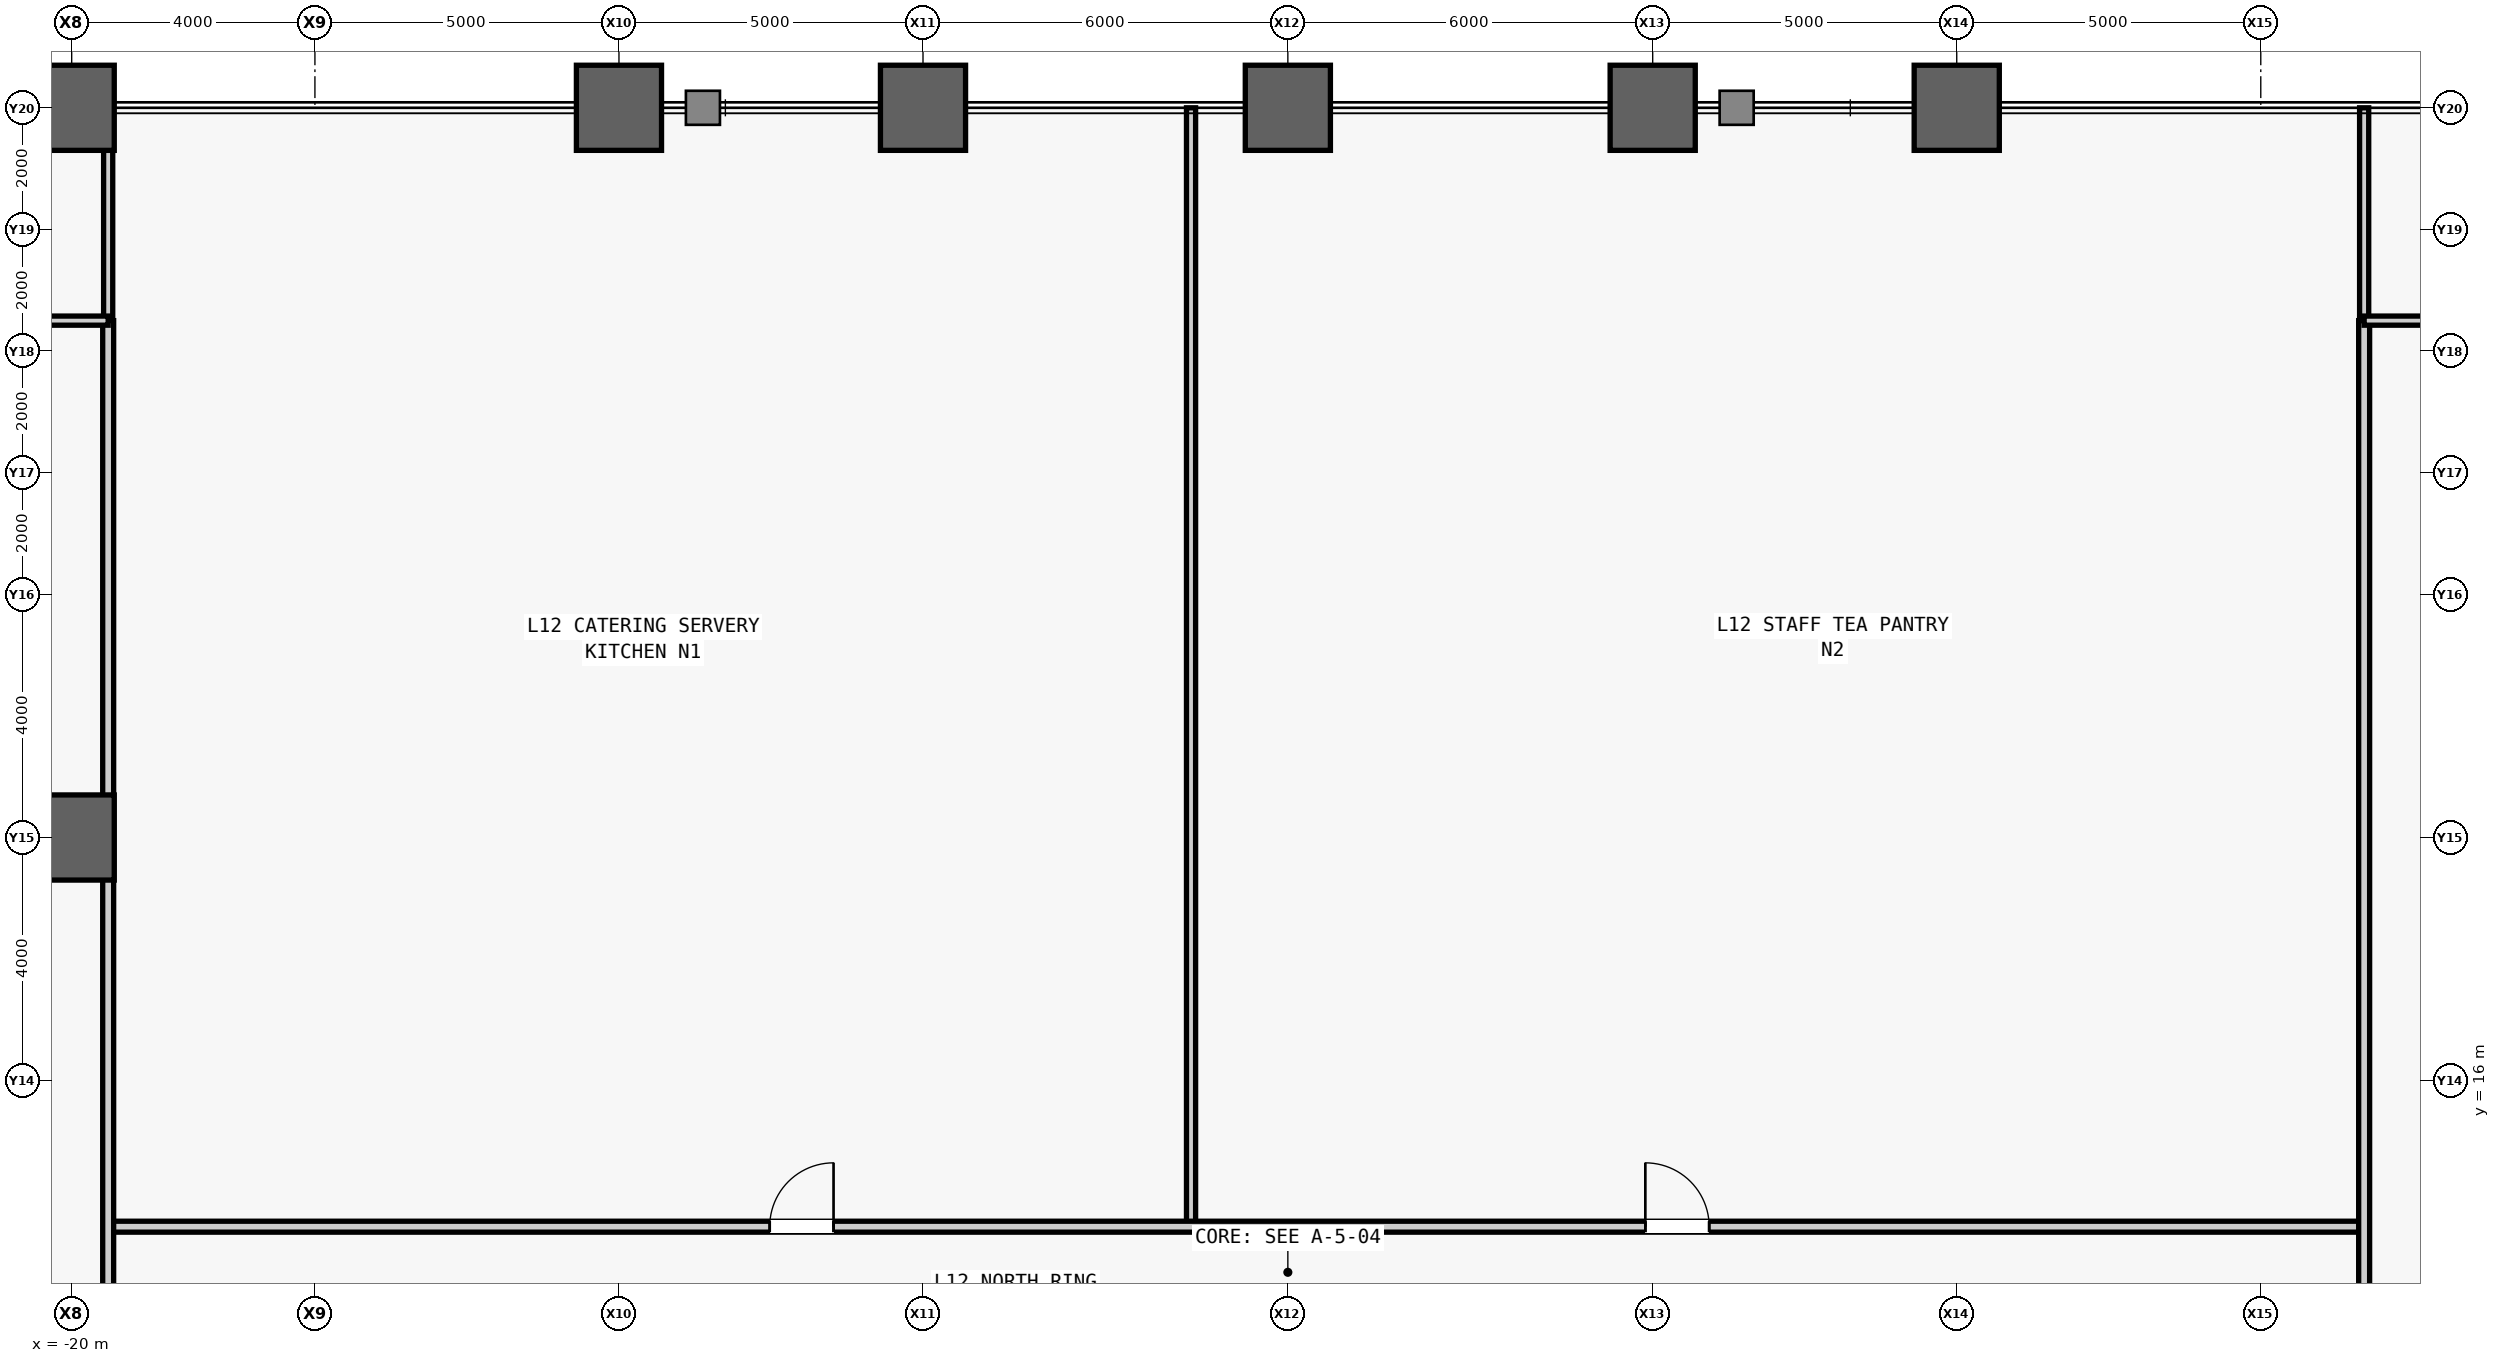
"""IFC4 building model, lengths in metres.
Left out: names, types, materials, properties, quantities, classifications, styles, units other than length and angle.
Written with IfcOpenShell. Run it as: python <this file> out.ifc"""

import sys

from ifc_helpers import new_model, si_unit, direction, frame, frame_2d, origin, origin_2d, place, context, subcontext, project, spatial, rectangle, hollow_rectangle, extrude, source, transform, mapped, element, fill, save


model = new_model("IFC4")
c1 = context("Model", 3, precision=1e-05, world=origin(), true_north=direction((0.0, 1.0)))
c2 = subcontext(c1, "Body", "Model", "MODEL_VIEW")
j1 = project(units=[si_unit("LENGTHUNIT", "METRE"), si_unit("PLANEANGLEUNIT", "RADIAN")], contexts=[c1])
p1 = place(None, origin())
s1 = spatial("IfcSite", under=j1, at=p1, CompositionType="ELEMENT")
p2 = place(p1, origin())
s2 = spatial("IfcBuilding", under=s1, at=p2, CompositionType="ELEMENT")
p3 = place(p2, frame((0.0, 0.0, 57.8)))
s3 = spatial("IfcBuildingStorey", under=s2, at=p3, CompositionType="ELEMENT", Elevation=57.8)
m1 = source(origin(), c2, "Body", "SweptSolid", [
    extrude(hollow_rectangle(XDim=1.4, YDim=1.4, WallThickness=0.075, at=origin_2d()), origin(), (0.0, 0.0, 1.0), 4.2),
])
for number, where, z_axis, x_axis in (
    (1, (-20.0, 20.0, 0.0), (0.0, 0.0, 1.0), (1.0, 0.0, 0.0)),
    (2, (-20.0, 32.0, 0.0), (0.0, 0.0, 1.0), (1.0, 0.0, 0.0)),
    (3, (-11.0, 32.0, 0.0), (0.0, 0.0, 1.0), (1.0, 0.0, 0.0)),
    (4, (-6.0, 32.0, 0.0), (0.0, 0.0, 1.0), (1.0, 0.0, 0.0)),
    (5, (0.0, 32.0, 0.0), (0.0, 0.0, 1.0), (1.0, 0.0, 0.0)),
    (6, (6.0, 32.0, 0.0), (0.0, 0.0, 1.0), (1.0, 0.0, 0.0)),
    (7, (11.0, 32.0, 0.0), (0.0, 0.0, 1.0), (1.0, 0.0, 0.0)),
):
    element("IfcColumn", number, at=place(p3, frame(where, z_axis=z_axis, x_axis=x_axis)), inside=s3, PredefinedType="COLUMN", context=c2, shape_type="MappedRepresentation", body=[
        mapped(m1, transform((0.0, 0.0, 0.0), scale=1.0)),
    ])
m2 = source(origin(), c2, "Body", "SweptSolid", [
    extrude(rectangle(XDim=18.4, YDim=0.15, at=frame_2d((9.2, 0.0))), origin(), (0.0, 0.0, 1.0), 3.94),
])
p4 = place(p3, frame((-1.592, 13.6, 0.0), z_axis=(0.0, 0.0, 1.0), x_axis=(0.0, 1.0, 0.0)))
e8 = element("IfcWall", 8, at=p4, inside=s3, PredefinedType="PARTITIONING", context=c2, shape_type="MappedRepresentation", body=[
    mapped(m2, transform((0.0, 0.0, 0.0), scale=1.0)),
])
m3 = source(origin(), c2, "Body", "SweptSolid", [
    extrude(rectangle(XDim=37.1, YDim=0.18, at=frame_2d((18.55, 0.0))), origin(), (0.0, 0.0, 1.0), 3.94),
])
p5 = place(p3, frame((-19.4, 13.6, 0.0), z_axis=(0.0, 0.0, 1.0), x_axis=(1.0, 0.0, 0.0)))
e9 = element("IfcWall", 9, at=p5, inside=s3, PredefinedType="PARTITIONING", context=c2, shape_type="MappedRepresentation", body=[
    mapped(m3, transform((0.0, 0.0, 0.0), scale=1.0)),
])
m4 = source(origin(), c2, "Body", "SweptSolid", [
    extrude(rectangle(XDim=1.05, YDim=2.2, at=frame_2d((0.525, 1.1))), frame((0.0, 0.1, 0.0), z_axis=(0.0, -1.0, 0.0), x_axis=(1.0, 0.0, 0.0)), (0.0, 0.0, 1.0), 0.2),
])
p6 = place(p5, frame((10.879, 0.0, 0.0)))
e10 = element("IfcOpeningElement", 10, at=p6, cuts=e9, PredefinedType="OPENING", context=c2, shape_type="MappedRepresentation", body=[
    mapped(m4, transform((0.0, 0.0, 0.0), scale=1.0)),
])
p7 = place(p5, frame((25.279, 0.0, 0.0)))
e11 = element("IfcOpeningElement", 11, at=p7, cuts=e9, PredefinedType="OPENING", context=c2, shape_type="MappedRepresentation", body=[
    mapped(m4, transform((0.0, 0.0, 0.0), scale=1.0)),
])
m5 = source(origin(), c2, "Body", "SweptSolid", [
    extrude(rectangle(XDim=3.5, YDim=0.15, at=frame_2d((1.75, 0.0))), origin(), (0.0, 0.0, 1.0), 3.94),
])
for number, where, z_axis, x_axis in (
    (12, (-19.4, 28.5, 0.0), (0.0, 0.0, 1.0), (0.0, 1.0, 0.0)),
    (13, (17.7, 28.5, 0.0), (0.0, 0.0, 1.0), (0.0, 1.0, 0.0)),
):
    element("IfcWall", number, at=place(p3, frame(where, z_axis=z_axis, x_axis=x_axis)), inside=s3, PredefinedType="PARTITIONING", context=c2, shape_type="MappedRepresentation", body=[
        mapped(m5, transform((0.0, 0.0, 0.0), scale=1.0)),
    ])
m6 = source(origin(), c2, "Body", "SweptSolid", [
    extrude(rectangle(XDim=57.0, YDim=0.18, at=frame_2d((28.5, 0.0))), origin(), (0.0, 0.0, 1.0), 3.471),
])
p8 = place(p3, frame((-19.4, -28.5, 0.0), z_axis=(0.0, 0.0, 1.0), x_axis=(0.0, 1.0, 0.0)))
e14 = element("IfcWall", 14, at=p8, inside=s3, PredefinedType="PARTITIONING", context=c2, shape_type="MappedRepresentation", body=[
    mapped(m6, transform((0.0, 0.0, 0.0), scale=1.0)),
])
m7 = source(origin(), c2, "Body", "SweptSolid", [
    extrude(rectangle(XDim=0.95, YDim=2.15, at=frame_2d((0.475, 1.075))), frame((0.0, 0.1, 0.0), z_axis=(0.0, -1.0, 0.0), x_axis=(1.0, 0.0, 0.0)), (0.0, 0.0, 1.0), 0.2),
])
p9 = place(p8, frame((16.455, 0.0, 0.0)))
e15 = element("IfcOpeningElement", 15, at=p9, cuts=e14, PredefinedType="OPENING", context=c2, shape_type="MappedRepresentation", body=[
    mapped(m7, transform((0.0, 0.0, 0.0), scale=1.0)),
])
p10 = place(p8, frame((22.664, 0.0, 0.0)))
e16 = element("IfcOpeningElement", 16, at=p10, cuts=e14, PredefinedType="OPENING", context=c2, shape_type="MappedRepresentation", body=[
    mapped(m7, transform((0.0, 0.0, 0.0), scale=1.0)),
])
p11 = place(p8, frame((30.305, 0.0, 0.0)))
e17 = element("IfcOpeningElement", 17, at=p11, cuts=e14, PredefinedType="OPENING", context=c2, shape_type="MappedRepresentation", body=[
    mapped(m7, transform((0.0, 0.0, 0.0), scale=1.0)),
])
p12 = place(p8, frame((37.646, 0.0, 0.0)))
e18 = element("IfcOpeningElement", 18, at=p12, cuts=e14, PredefinedType="OPENING", context=c2, shape_type="MappedRepresentation", body=[
    mapped(m7, transform((0.0, 0.0, 0.0), scale=1.0)),
])
m8 = source(origin(), c2, "Body", "SweptSolid", [
    extrude(rectangle(XDim=57.0, YDim=0.18, at=frame_2d((28.5, 0.0))), origin(), (0.0, 0.0, 1.0), 3.94),
])
p13 = place(p3, frame((17.7, -28.5, 0.0), z_axis=(0.0, 0.0, 1.0), x_axis=(0.0, 1.0, 0.0)))
e19 = element("IfcWall", 19, at=p13, inside=s3, PredefinedType="PARTITIONING", context=c2, shape_type="MappedRepresentation", body=[
    mapped(m8, transform((0.0, 0.0, 0.0), scale=1.0)),
])
p14 = place(p13, frame((20.7, 0.0, 0.0)))
e20 = element("IfcOpeningElement", 20, at=p14, cuts=e19, PredefinedType="OPENING", context=c2, shape_type="MappedRepresentation", body=[
    mapped(m7, transform((0.0, 0.0, 0.0), scale=1.0)),
])
p15 = place(p13, frame((34.25, 0.0, 0.0)))
e21 = element("IfcOpeningElement", 21, at=p15, cuts=e19, PredefinedType="OPENING", context=c2, shape_type="MappedRepresentation", body=[
    mapped(m7, transform((0.0, 0.0, 0.0), scale=1.0)),
])
m9 = source(origin(), c2, "Body", "SweptSolid", [
    extrude(rectangle(XDim=9.1, YDim=0.15, at=frame_2d((4.55, 0.0))), origin(), (0.0, 0.0, 1.0), 3.94),
])
p16 = place(p3, frame((-28.5, 28.5, 0.0), z_axis=(0.0, 0.0, 1.0), x_axis=(1.0, 0.0, 0.0)))
e22 = element("IfcWall", 22, at=p16, inside=s3, PredefinedType="PARTITIONING", context=c2, shape_type="MappedRepresentation", body=[
    mapped(m9, transform((0.0, 0.0, 0.0), scale=1.0)),
])
m10 = source(origin(), c2, "Body", "SweptSolid", [
    extrude(rectangle(XDim=0.95, YDim=2.15, at=frame_2d((0.475, 1.075))), frame((0.0, 0.085, 0.0), z_axis=(0.0, -1.0, 0.0), x_axis=(1.0, 0.0, 0.0)), (0.0, 0.0, 1.0), 0.17),
])
p17 = place(p16, frame((4.075, 0.0, 0.0)))
e23 = element("IfcOpeningElement", 23, at=p17, cuts=e22, PredefinedType="OPENING", context=c2, shape_type="MappedRepresentation", body=[
    mapped(m10, transform((0.0, 0.0, 0.0), scale=1.0)),
])
m11 = source(origin(), c2, "Body", "SweptSolid", [
    extrude(rectangle(XDim=10.8, YDim=0.15, at=frame_2d((5.4, 0.0))), origin(), (0.0, 0.0, 1.0), 3.94),
])
p18 = place(p3, frame((17.7, 28.5, 0.0), z_axis=(0.0, 0.0, 1.0), x_axis=(1.0, 0.0, 0.0)))
e24 = element("IfcWall", 24, at=p18, inside=s3, PredefinedType="PARTITIONING", context=c2, shape_type="MappedRepresentation", body=[
    mapped(m11, transform((0.0, 0.0, 0.0), scale=1.0)),
])
p19 = place(p18, frame((4.925, 0.0, 0.0)))
e25 = element("IfcOpeningElement", 25, at=p19, cuts=e24, PredefinedType="OPENING", context=c2, shape_type="MappedRepresentation", body=[
    mapped(m10, transform((0.0, 0.0, 0.0), scale=1.0)),
])
m12 = source(origin(), c2, "Body", "SweptSolid", [
    extrude(rectangle(XDim=1.05, YDim=2.2, at=frame_2d((0.525, 1.1))), frame((0.0, 0.025, 0.0), z_axis=(0.0, -1.0, 0.0), x_axis=(1.0, 0.0, 0.0)), (0.0, 0.0, 1.0), 0.05),
])
p20 = place(p6, origin())
e26 = element("IfcDoor", 26, at=p20, inside=s3, OperationType="SINGLE_SWING_RIGHT", PredefinedType="DOOR", context=c2, shape_type="MappedRepresentation", body=[
    mapped(m12, transform((0.0, 0.0, 0.0), scale=1.0)),
])
fill(e10, e26)
p21 = place(p7, origin())
e27 = element("IfcDoor", 27, at=p21, inside=s3, OperationType="SINGLE_SWING_LEFT", PredefinedType="DOOR", context=c2, shape_type="MappedRepresentation", body=[
    mapped(m12, transform((0.0, 0.0, 0.0), scale=1.0)),
])
fill(e11, e27)
save(model, sys.argv[1])
